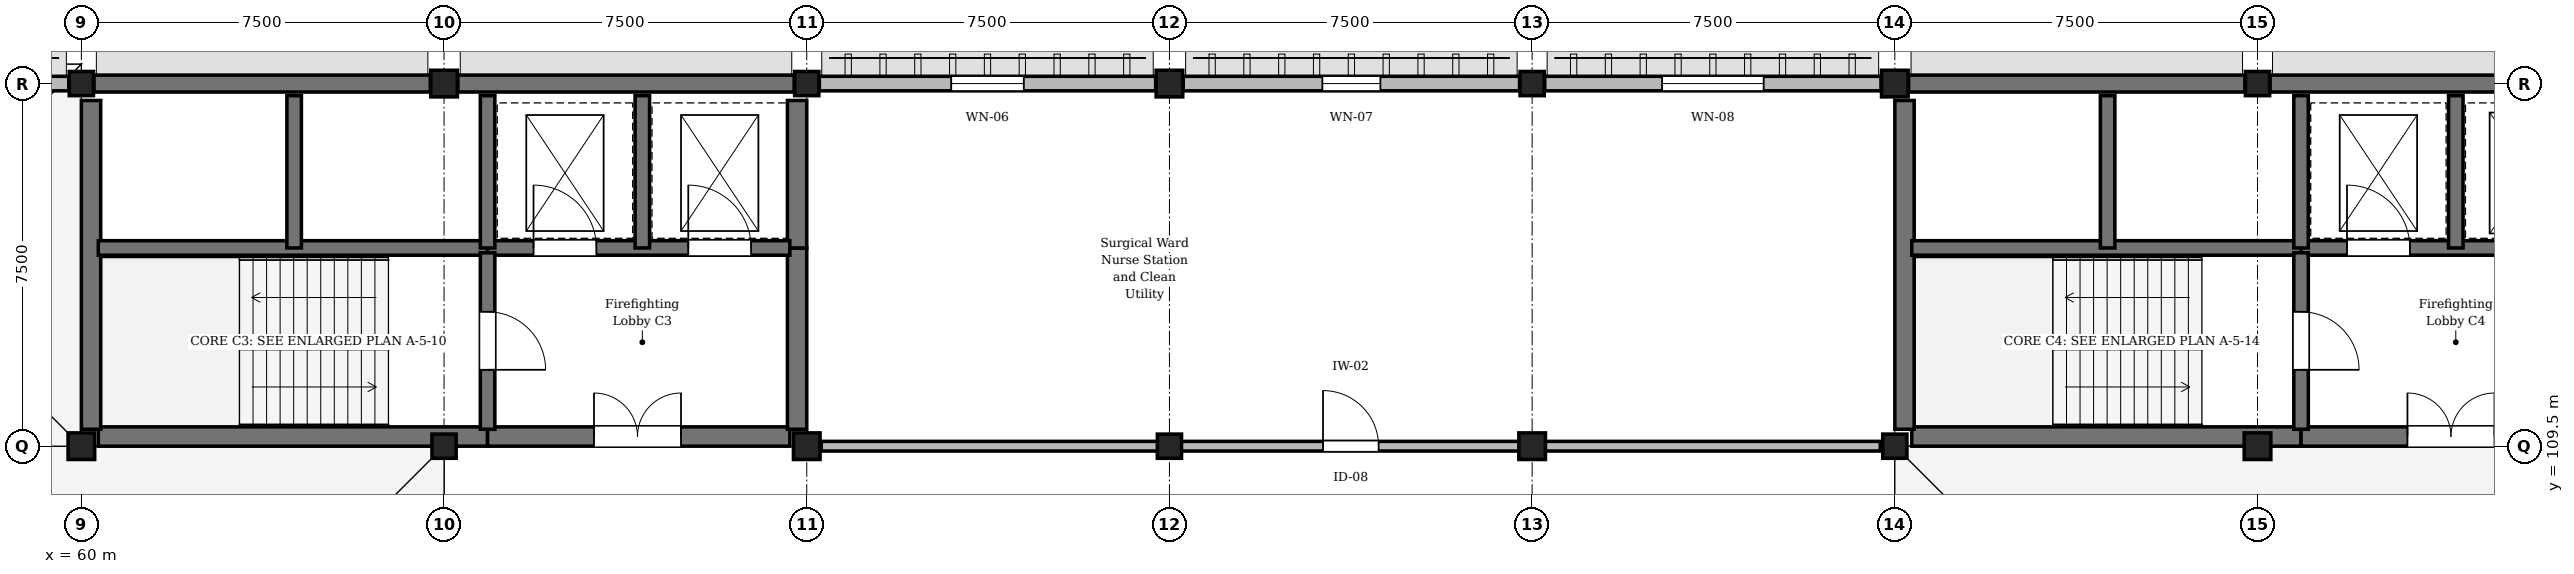
"""IFC4 building model, lengths in metres.
Left out: names, types, materials, properties, quantities, classifications, styles, units other than length and angle.
Written with IfcOpenShell. Run it as: python <this file> out.ifc"""

import sys

from ifc_helpers import new_model, si_unit, direction, frame, frame_2d, origin, origin_2d, place, context, subcontext, project, spatial, rectangle, extrude, element, fill, save


model = new_model("IFC4")
c1 = context("Model", 3, precision=1e-05, world=origin(), true_north=direction((0.0, 1.0)))
c2 = subcontext(c1, "Body", "Model", "MODEL_VIEW")
j1 = project(units=[si_unit("LENGTHUNIT", "METRE"), si_unit("PLANEANGLEUNIT", "RADIAN")], contexts=[c1])
p1 = place(None, origin())
s1 = spatial("IfcSite", under=j1, at=p1, CompositionType="ELEMENT")
p2 = place(p1, origin())
s2 = spatial("IfcBuilding", under=s1, at=p2, CompositionType="ELEMENT")
p3 = place(p2, frame((0.0, 0.0, 17.85)))
s3 = spatial("IfcBuildingStorey", under=s2, at=p3, CompositionType="ELEMENT", Elevation=17.85)
p4 = place(p3, frame((60.0, 109.5, 0.0), z_axis=(0.0, 0.0, 1.0), x_axis=(1.0, 0.0, 0.0)))
e1 = element("IfcColumn", 1, at=p4, inside=s3, PredefinedType="COLUMN", context=c2, shape_type="SweptSolid", body=[
    extrude(rectangle(XDim=0.55, YDim=0.55, at=origin_2d()), origin(), (0.0, 0.0, 1.0), 4.05),
])
for number, where, z_axis, x_axis in (
    (2, (60.0, 117.0, 0.0), (0.0, 0.0, 1.0), (1.0, 0.0, 0.0)),
    (3, (67.5, 109.5, 0.0), (0.0, 0.0, 1.0), (1.0, 0.0, 0.0)),
):
    element("IfcColumn", number, at=place(p3, frame(where, z_axis=z_axis, x_axis=x_axis)), inside=s3, PredefinedType="COLUMN", context=c2, shape_type="SweptSolid", body=[
        extrude(rectangle(XDim=0.5, YDim=0.5, at=origin_2d()), origin(), (0.0, 0.0, 1.0), 4.05),
    ])
for number, where, z_axis, x_axis in (
    (4, (67.5, 117.0, 0.0), (0.0, 0.0, 1.0), (1.0, 0.0, 0.0)),
    (5, (75.0, 109.5, 0.0), (0.0, 0.0, 1.0), (1.0, 0.0, 0.0)),
):
    element("IfcColumn", number, at=place(p3, frame(where, z_axis=z_axis, x_axis=x_axis)), inside=s3, PredefinedType="COLUMN", context=c2, shape_type="SweptSolid", body=[
        extrude(rectangle(XDim=0.55, YDim=0.55, at=origin_2d()), origin(), (0.0, 0.0, 1.0), 4.05),
    ])
for number, where, z_axis, x_axis in (
    (6, (75.0, 117.0, 0.0), (0.0, 0.0, 1.0), (1.0, 0.0, 0.0)),
    (7, (82.5, 109.5, 0.0), (0.0, 0.0, 1.0), (1.0, 0.0, 0.0)),
):
    element("IfcColumn", number, at=place(p3, frame(where, z_axis=z_axis, x_axis=x_axis)), inside=s3, PredefinedType="COLUMN", context=c2, shape_type="SweptSolid", body=[
        extrude(rectangle(XDim=0.5, YDim=0.5, at=origin_2d()), origin(), (0.0, 0.0, 1.0), 4.05),
    ])
for number, where, z_axis, x_axis in (
    (8, (82.5, 117.0, 0.0), (0.0, 0.0, 1.0), (1.0, 0.0, 0.0)),
    (9, (90.0, 109.5, 0.0), (0.0, 0.0, 1.0), (1.0, 0.0, 0.0)),
):
    element("IfcColumn", number, at=place(p3, frame(where, z_axis=z_axis, x_axis=x_axis)), inside=s3, PredefinedType="COLUMN", context=c2, shape_type="SweptSolid", body=[
        extrude(rectangle(XDim=0.55, YDim=0.55, at=origin_2d()), origin(), (0.0, 0.0, 1.0), 4.05),
    ])
for number, where, z_axis, x_axis in (
    (10, (90.0, 117.0, 0.0), (0.0, 0.0, 1.0), (1.0, 0.0, 0.0)),
    (11, (97.5, 109.5, 0.0), (0.0, 0.0, 1.0), (1.0, 0.0, 0.0)),
):
    element("IfcColumn", number, at=place(p3, frame(where, z_axis=z_axis, x_axis=x_axis)), inside=s3, PredefinedType="COLUMN", context=c2, shape_type="SweptSolid", body=[
        extrude(rectangle(XDim=0.5, YDim=0.5, at=origin_2d()), origin(), (0.0, 0.0, 1.0), 4.05),
    ])
for number, where, z_axis, x_axis in (
    (12, (97.5, 117.0, 0.0), (0.0, 0.0, 1.0), (1.0, 0.0, 0.0)),
    (13, (105.0, 109.5, 0.0), (0.0, 0.0, 1.0), (1.0, 0.0, 0.0)),
):
    element("IfcColumn", number, at=place(p3, frame(where, z_axis=z_axis, x_axis=x_axis)), inside=s3, PredefinedType="COLUMN", context=c2, shape_type="SweptSolid", body=[
        extrude(rectangle(XDim=0.55, YDim=0.55, at=origin_2d()), origin(), (0.0, 0.0, 1.0), 4.05),
    ])
p5 = place(p3, frame((105.0, 117.0, 0.0), z_axis=(0.0, 0.0, 1.0), x_axis=(1.0, 0.0, 0.0)))
e14 = element("IfcColumn", 14, at=p5, inside=s3, PredefinedType="COLUMN", context=c2, shape_type="SweptSolid", body=[
    extrude(rectangle(XDim=0.5, YDim=0.5, at=origin_2d()), origin(), (0.0, 0.0, 1.0), 4.05),
])
p6 = place(p3, frame((52.735, 117.0, 0.0), z_axis=(0.0, 0.0, 1.0), x_axis=(1.0, 0.0, 0.0)))
e15 = element("IfcWall", 15, at=p6, inside=s3, PredefinedType="STANDARD", context=c2, shape_type="SweptSolid", body=[
    extrude(rectangle(XDim=7.005, YDim=0.3, at=frame_2d((3.502, 0.0))), origin(), (0.0, 0.0, 1.0), 3.77),
])
p7 = place(p6, frame((2.452, 0.0, 0.9)))
e16 = element("IfcOpeningElement", 16, at=p7, cuts=e15, PredefinedType="OPENING", context=c2, shape_type="SweptSolid", body=[
    extrude(rectangle(XDim=2.1, YDim=2.4, at=frame_2d((1.05, 1.2))), frame((0.0, 0.16, 0.0), z_axis=(0.0, -1.0, 0.0), x_axis=(1.0, 0.0, 0.0)), (0.0, 0.0, 1.0), 0.32),
])
for number, where, z_axis, x_axis in (
    (17, (60.26, 117.0, 0.0), (0.0, 0.0, 1.0), (1.0, 0.0, 0.0)),
    (18, (67.785, 117.0, 0.0), (0.0, 0.0, 1.0), (1.0, 0.0, 0.0)),
):
    element("IfcWall", number, at=place(p3, frame(where, z_axis=z_axis, x_axis=x_axis)), inside=s3, PredefinedType="SHEAR", context=c2, shape_type="SweptSolid", body=[
        extrude(rectangle(XDim=6.955, YDim=0.35, at=frame_2d((3.478, 0.0))), origin(), (0.0, 0.0, 1.0), 3.77),
    ])
p8 = place(p3, frame((75.26, 117.0, 0.0), z_axis=(0.0, 0.0, 1.0), x_axis=(1.0, 0.0, 0.0)))
e19 = element("IfcWall", 19, at=p8, inside=s3, PredefinedType="STANDARD", context=c2, shape_type="SweptSolid", body=[
    extrude(rectangle(XDim=6.955, YDim=0.3, at=frame_2d((3.478, 0.0))), origin(), (0.0, 0.0, 1.0), 3.17),
])
p9 = place(p8, frame((2.728, 0.0, 0.9)))
e20 = element("IfcOpeningElement", 20, at=p9, cuts=e19, PredefinedType="OPENING", context=c2, shape_type="SweptSolid", body=[
    extrude(rectangle(XDim=1.5, YDim=1.99, at=frame_2d((0.75, 0.995))), frame((0.0, 0.16, 0.0), z_axis=(0.0, -1.0, 0.0), x_axis=(1.0, 0.0, 0.0)), (0.0, 0.0, 1.0), 0.32),
])
p10 = place(p3, frame((82.785, 117.0, 0.0), z_axis=(0.0, 0.0, 1.0), x_axis=(1.0, 0.0, 0.0)))
e21 = element("IfcWall", 21, at=p10, inside=s3, PredefinedType="STANDARD", context=c2, shape_type="SweptSolid", body=[
    extrude(rectangle(XDim=6.955, YDim=0.3, at=frame_2d((3.478, 0.0))), origin(), (0.0, 0.0, 1.0), 3.17),
])
p11 = place(p10, frame((2.877, 0.0, 0.9)))
e22 = element("IfcOpeningElement", 22, at=p11, cuts=e21, PredefinedType="OPENING", context=c2, shape_type="SweptSolid", body=[
    extrude(rectangle(XDim=1.2, YDim=1.99, at=frame_2d((0.6, 0.995))), frame((0.0, 0.16, 0.0), z_axis=(0.0, -1.0, 0.0), x_axis=(1.0, 0.0, 0.0)), (0.0, 0.0, 1.0), 0.32),
])
p12 = place(p3, frame((90.26, 117.0, 0.0), z_axis=(0.0, 0.0, 1.0), x_axis=(1.0, 0.0, 0.0)))
e23 = element("IfcWall", 23, at=p12, inside=s3, PredefinedType="STANDARD", context=c2, shape_type="SweptSolid", body=[
    extrude(rectangle(XDim=6.955, YDim=0.3, at=frame_2d((3.478, 0.0))), origin(), (0.0, 0.0, 1.0), 3.17),
])
p13 = place(p12, frame((2.427, 0.0, 0.9)))
e24 = element("IfcOpeningElement", 24, at=p13, cuts=e23, PredefinedType="OPENING", context=c2, shape_type="SweptSolid", body=[
    extrude(rectangle(XDim=2.1, YDim=1.99, at=frame_2d((1.05, 0.995))), frame((0.0, 0.16, 0.0), z_axis=(0.0, -1.0, 0.0), x_axis=(1.0, 0.0, 0.0)), (0.0, 0.0, 1.0), 0.32),
])
for number, where, z_axis, x_axis in (
    (25, (97.785, 117.0, 0.0), (0.0, 0.0, 1.0), (1.0, 0.0, 0.0)),
    (26, (105.26, 117.0, 0.0), (0.0, 0.0, 1.0), (1.0, 0.0, 0.0)),
):
    element("IfcWall", number, at=place(p3, frame(where, z_axis=z_axis, x_axis=x_axis)), inside=s3, PredefinedType="SHEAR", context=c2, shape_type="SweptSolid", body=[
        extrude(rectangle(XDim=6.955, YDim=0.35, at=frame_2d((3.478, 0.0))), origin(), (0.0, 0.0, 1.0), 3.77),
    ])
p14 = place(p3, frame((60.35, 109.7, 0.0), z_axis=(0.0, 0.0, 1.0), x_axis=(1.0, 0.0, 0.0)))
e27 = element("IfcWall", 27, at=p14, inside=s3, PredefinedType="SHEAR", context=c2, shape_type="SweptSolid", body=[
    extrude(rectangle(XDim=8.05, YDim=0.4, at=frame_2d((4.025, 0.0))), origin(), (0.0, 0.0, 1.0), 3.77),
])
p15 = place(p3, frame((68.4, 109.7, 0.0), z_axis=(0.0, 0.0, 1.0), x_axis=(1.0, 0.0, 0.0)))
e28 = element("IfcWall", 28, at=p15, inside=s3, PredefinedType="SHEAR", context=c2, shape_type="SweptSolid", body=[
    extrude(rectangle(XDim=6.25, YDim=0.4, at=frame_2d((3.125, 0.0))), origin(), (0.0, 0.0, 1.0), 3.77),
])
p16 = place(p15, frame((2.2, 0.0, 0.0)))
e29 = element("IfcOpeningElement", 29, at=p16, cuts=e28, PredefinedType="OPENING", context=c2, shape_type="SweptSolid", body=[
    extrude(rectangle(XDim=1.8, YDim=2.25, at=frame_2d((0.9, 1.125))), frame((0.0, 0.21, 0.0), z_axis=(0.0, -1.0, 0.0), x_axis=(1.0, 0.0, 0.0)), (0.0, 0.0, 1.0), 0.42),
])
p17 = place(p3, frame((60.2, 109.85, 0.0), z_axis=(0.0, 0.0, 1.0), x_axis=(0.0, 1.0, 0.0)))
e30 = element("IfcWall", 30, at=p17, inside=s3, PredefinedType="SHEAR", context=c2, shape_type="SweptSolid", body=[
    extrude(rectangle(XDim=6.8, YDim=0.4, at=frame_2d((3.4, 0.0))), origin(), (0.0, 0.0, 1.0), 3.77),
])
p18 = place(p3, frame((74.8, 109.85, 0.0), z_axis=(0.0, 0.0, 1.0), x_axis=(0.0, 1.0, 0.0)))
e31 = element("IfcWall", 31, at=p18, inside=s3, PredefinedType="SHEAR", context=c2, shape_type="SweptSolid", body=[
    extrude(rectangle(XDim=3.75, YDim=0.4, at=frame_2d((1.875, 0.0))), origin(), (0.0, 0.0, 1.0), 3.77),
])
p19 = place(p3, frame((74.8, 113.6, 0.0), z_axis=(0.0, 0.0, 1.0), x_axis=(0.0, 1.0, 0.0)))
e32 = element("IfcWall", 32, at=p19, inside=s3, PredefinedType="SHEAR", context=c2, shape_type="SweptSolid", body=[
    extrude(rectangle(XDim=3.05, YDim=0.4, at=frame_2d((1.525, 0.0))), origin(), (0.0, 0.0, 1.0), 3.77),
])
p20 = place(p3, frame((60.35, 113.6, 0.0), z_axis=(0.0, 0.0, 1.0), x_axis=(1.0, 0.0, 0.0)))
e33 = element("IfcWall", 33, at=p20, inside=s3, PredefinedType="SHEAR", context=c2, shape_type="SweptSolid", body=[
    extrude(rectangle(XDim=8.05, YDim=0.3, at=frame_2d((4.025, 0.0))), origin(), (0.0, 0.0, 1.0), 3.77),
])
p21 = place(p3, frame((68.4, 113.6, 0.0), z_axis=(0.0, 0.0, 1.0), x_axis=(1.0, 0.0, 0.0)))
e34 = element("IfcWall", 34, at=p21, inside=s3, PredefinedType="SHEAR", context=c2, shape_type="SweptSolid", body=[
    extrude(rectangle(XDim=6.25, YDim=0.3, at=frame_2d((3.125, 0.0))), origin(), (0.0, 0.0, 1.0), 3.77),
])
p22 = place(p21, frame((0.95, 0.0, 0.0)))
e35 = element("IfcOpeningElement", 35, at=p22, cuts=e34, PredefinedType="OPENING", context=c2, shape_type="SweptSolid", body=[
    extrude(rectangle(XDim=1.3, YDim=2.2, at=frame_2d((0.65, 1.1))), frame((0.0, 0.16, 0.0), z_axis=(0.0, -1.0, 0.0), x_axis=(1.0, 0.0, 0.0)), (0.0, 0.0, 1.0), 0.32),
])
p23 = place(p21, frame((4.15, 0.0, 0.0)))
e36 = element("IfcOpeningElement", 36, at=p23, cuts=e34, PredefinedType="OPENING", context=c2, shape_type="SweptSolid", body=[
    extrude(rectangle(XDim=1.3, YDim=2.2, at=frame_2d((0.65, 1.1))), frame((0.0, 0.16, 0.0), z_axis=(0.0, -1.0, 0.0), x_axis=(1.0, 0.0, 0.0)), (0.0, 0.0, 1.0), 0.32),
])
p24 = place(p3, frame((68.4, 113.5, 0.0), z_axis=(0.0, 0.0, 1.0), x_axis=(0.0, -1.0, 0.0)))
e37 = element("IfcWall", 37, at=p24, inside=s3, PredefinedType="SHEAR", context=c2, shape_type="SweptSolid", body=[
    extrude(rectangle(XDim=3.65, YDim=0.3, at=frame_2d((1.825, 0.0))), origin(), (0.0, 0.0, 1.0), 3.77),
])
p25 = place(p24, frame((1.22, 0.0, 0.0)))
e38 = element("IfcOpeningElement", 38, at=p25, cuts=e37, PredefinedType="OPENING", context=c2, shape_type="SweptSolid", body=[
    extrude(rectangle(XDim=1.2, YDim=2.25, at=frame_2d((0.6, 1.125))), frame((0.0, 0.16, 0.0), z_axis=(0.0, -1.0, 0.0), x_axis=(1.0, 0.0, 0.0)), (0.0, 0.0, 1.0), 0.32),
])
for number, where, z_axis, x_axis in (
    (39, (64.4, 113.6, 0.0), (0.0, 0.0, 1.0), (0.0, 1.0, 0.0)),
    (40, (68.4, 113.6, 0.0), (0.0, 0.0, 1.0), (0.0, 1.0, 0.0)),
    (41, (71.6, 113.6, 0.0), (0.0, 0.0, 1.0), (0.0, 1.0, 0.0)),
):
    element("IfcWall", number, at=place(p3, frame(where, z_axis=z_axis, x_axis=x_axis)), inside=s3, PredefinedType="SHEAR", context=c2, shape_type="SweptSolid", body=[
        extrude(rectangle(XDim=3.15, YDim=0.3, at=frame_2d((1.575, 0.0))), origin(), (0.0, 0.0, 1.0), 3.77),
    ])
p26 = place(p3, frame((97.85, 109.7, 0.0), z_axis=(0.0, 0.0, 1.0), x_axis=(1.0, 0.0, 0.0)))
e42 = element("IfcWall", 42, at=p26, inside=s3, PredefinedType="SHEAR", context=c2, shape_type="SweptSolid", body=[
    extrude(rectangle(XDim=8.05, YDim=0.4, at=frame_2d((4.025, 0.0))), origin(), (0.0, 0.0, 1.0), 3.77),
])
p27 = place(p3, frame((105.9, 109.7, 0.0), z_axis=(0.0, 0.0, 1.0), x_axis=(1.0, 0.0, 0.0)))
e43 = element("IfcWall", 43, at=p27, inside=s3, PredefinedType="SHEAR", context=c2, shape_type="SweptSolid", body=[
    extrude(rectangle(XDim=6.25, YDim=0.4, at=frame_2d((3.125, 0.0))), origin(), (0.0, 0.0, 1.0), 3.77),
])
p28 = place(p27, frame((2.2, 0.0, 0.0)))
e44 = element("IfcOpeningElement", 44, at=p28, cuts=e43, PredefinedType="OPENING", context=c2, shape_type="SweptSolid", body=[
    extrude(rectangle(XDim=1.8, YDim=2.25, at=frame_2d((0.9, 1.125))), frame((0.0, 0.21, 0.0), z_axis=(0.0, -1.0, 0.0), x_axis=(1.0, 0.0, 0.0)), (0.0, 0.0, 1.0), 0.42),
])
p29 = place(p3, frame((97.7, 109.85, 0.0), z_axis=(0.0, 0.0, 1.0), x_axis=(0.0, 1.0, 0.0)))
e45 = element("IfcWall", 45, at=p29, inside=s3, PredefinedType="SHEAR", context=c2, shape_type="SweptSolid", body=[
    extrude(rectangle(XDim=6.8, YDim=0.4, at=frame_2d((3.4, 0.0))), origin(), (0.0, 0.0, 1.0), 3.77),
])
p30 = place(p3, frame((97.85, 113.6, 0.0), z_axis=(0.0, 0.0, 1.0), x_axis=(1.0, 0.0, 0.0)))
e46 = element("IfcWall", 46, at=p30, inside=s3, PredefinedType="SHEAR", context=c2, shape_type="SweptSolid", body=[
    extrude(rectangle(XDim=8.05, YDim=0.3, at=frame_2d((4.025, 0.0))), origin(), (0.0, 0.0, 1.0), 3.77),
])
p31 = place(p3, frame((105.9, 113.6, 0.0), z_axis=(0.0, 0.0, 1.0), x_axis=(1.0, 0.0, 0.0)))
e47 = element("IfcWall", 47, at=p31, inside=s3, PredefinedType="SHEAR", context=c2, shape_type="SweptSolid", body=[
    extrude(rectangle(XDim=6.25, YDim=0.3, at=frame_2d((3.125, 0.0))), origin(), (0.0, 0.0, 1.0), 3.77),
])
p32 = place(p31, frame((0.95, 0.0, 0.0)))
e48 = element("IfcOpeningElement", 48, at=p32, cuts=e47, PredefinedType="OPENING", context=c2, shape_type="SweptSolid", body=[
    extrude(rectangle(XDim=1.3, YDim=2.2, at=frame_2d((0.65, 1.1))), frame((0.0, 0.16, 0.0), z_axis=(0.0, -1.0, 0.0), x_axis=(1.0, 0.0, 0.0)), (0.0, 0.0, 1.0), 0.32),
])
p33 = place(p31, frame((4.1, 0.0, 0.0)))
e49 = element("IfcOpeningElement", 49, at=p33, cuts=e47, PredefinedType="OPENING", context=c2, shape_type="SweptSolid", body=[
    extrude(rectangle(XDim=1.4, YDim=2.25, at=frame_2d((0.7, 1.125))), frame((0.0, 0.16, 0.0), z_axis=(0.0, -1.0, 0.0), x_axis=(1.0, 0.0, 0.0)), (0.0, 0.0, 1.0), 0.32),
])
p34 = place(p3, frame((105.9, 113.5, 0.0), z_axis=(0.0, 0.0, 1.0), x_axis=(0.0, -1.0, 0.0)))
e50 = element("IfcWall", 50, at=p34, inside=s3, PredefinedType="SHEAR", context=c2, shape_type="SweptSolid", body=[
    extrude(rectangle(XDim=3.65, YDim=0.3, at=frame_2d((1.825, 0.0))), origin(), (0.0, 0.0, 1.0), 3.77),
])
p35 = place(p34, frame((1.22, 0.0, 0.0)))
e51 = element("IfcOpeningElement", 51, at=p35, cuts=e50, PredefinedType="OPENING", context=c2, shape_type="SweptSolid", body=[
    extrude(rectangle(XDim=1.2, YDim=2.25, at=frame_2d((0.6, 1.125))), frame((0.0, 0.16, 0.0), z_axis=(0.0, -1.0, 0.0), x_axis=(1.0, 0.0, 0.0)), (0.0, 0.0, 1.0), 0.32),
])
for number, where, z_axis, x_axis in (
    (52, (101.9, 113.6, 0.0), (0.0, 0.0, 1.0), (0.0, 1.0, 0.0)),
    (53, (105.9, 113.6, 0.0), (0.0, 0.0, 1.0), (0.0, 1.0, 0.0)),
    (54, (109.1, 113.6, 0.0), (0.0, 0.0, 1.0), (0.0, 1.0, 0.0)),
):
    element("IfcWall", number, at=place(p3, frame(where, z_axis=z_axis, x_axis=x_axis)), inside=s3, PredefinedType="SHEAR", context=c2, shape_type="SweptSolid", body=[
        extrude(rectangle(XDim=3.15, YDim=0.3, at=frame_2d((1.575, 0.0))), origin(), (0.0, 0.0, 1.0), 3.77),
    ])
p36 = place(p3, frame((75.3, 109.5, 0.0), z_axis=(0.0, 0.0, 1.0), x_axis=(1.0, 0.0, 0.0)))
e55 = element("IfcWall", 55, at=p36, inside=s3, PredefinedType="STANDARD", context=c2, shape_type="SweptSolid", body=[
    extrude(rectangle(XDim=21.9, YDim=0.2, at=frame_2d((10.95, 0.0))), origin(), (0.0, 0.0, 1.0), 3.015),
])
p37 = place(p36, frame((10.375, 0.0, 0.0)))
e56 = element("IfcOpeningElement", 56, at=p37, cuts=e55, PredefinedType="OPENING", context=c2, shape_type="SweptSolid", body=[
    extrude(rectangle(XDim=1.15, YDim=2.2, at=frame_2d((0.575, 1.1))), frame((0.0, 0.11, 0.0), z_axis=(0.0, -1.0, 0.0), x_axis=(1.0, 0.0, 0.0)), (0.0, 0.0, 1.0), 0.22),
])
p38 = place(p9, origin())
e57 = element("IfcWindow", 57, at=p38, inside=s3, PartitioningType="SINGLE_PANEL", PredefinedType="WINDOW", context=c2, shape_type="SweptSolid", body=[
    extrude(rectangle(XDim=1.5, YDim=1.99, at=frame_2d((0.75, 0.995))), frame((0.0, 0.03, 0.0), z_axis=(0.0, -1.0, 0.0), x_axis=(1.0, 0.0, 0.0)), (0.0, 0.0, 1.0), 0.06),
])
fill(e20, e57)
p39 = place(p11, origin())
e58 = element("IfcWindow", 58, at=p39, inside=s3, PartitioningType="SINGLE_PANEL", PredefinedType="WINDOW", context=c2, shape_type="SweptSolid", body=[
    extrude(rectangle(XDim=1.2, YDim=1.99, at=frame_2d((0.6, 0.995))), frame((0.0, 0.03, 0.0), z_axis=(0.0, -1.0, 0.0), x_axis=(1.0, 0.0, 0.0)), (0.0, 0.0, 1.0), 0.06),
])
fill(e22, e58)
p40 = place(p13, origin())
e59 = element("IfcWindow", 59, at=p40, inside=s3, PartitioningType="SINGLE_PANEL", PredefinedType="WINDOW", context=c2, shape_type="SweptSolid", body=[
    extrude(rectangle(XDim=2.1, YDim=1.99, at=frame_2d((1.05, 0.995))), frame((0.0, 0.03, 0.0), z_axis=(0.0, -1.0, 0.0), x_axis=(1.0, 0.0, 0.0)), (0.0, 0.0, 1.0), 0.06),
])
fill(e24, e59)
p41 = place(p16, origin())
e60 = element("IfcDoor", 60, at=p41, inside=s3, OperationType="DOUBLE_DOOR_SINGLE_SWING", PredefinedType="DOOR", context=c2, shape_type="SweptSolid", body=[
    extrude(rectangle(XDim=1.8, YDim=2.25, at=frame_2d((0.9, 1.125))), frame((0.0, 0.025, 0.0), z_axis=(0.0, -1.0, 0.0), x_axis=(1.0, 0.0, 0.0)), (0.0, 0.0, 1.0), 0.05),
])
fill(e29, e60)
p42 = place(p22, origin())
e61 = element("IfcDoor", 61, at=p42, inside=s3, OperationType="DOUBLE_DOOR_SLIDING", PredefinedType="DOOR", context=c2, shape_type="SweptSolid", body=[
    extrude(rectangle(XDim=1.3, YDim=2.2, at=frame_2d((0.65, 1.1))), frame((0.0, 0.025, 0.0), z_axis=(0.0, -1.0, 0.0), x_axis=(1.0, 0.0, 0.0)), (0.0, 0.0, 1.0), 0.05),
])
fill(e35, e61)
p43 = place(p23, origin())
e62 = element("IfcDoor", 62, at=p43, inside=s3, OperationType="DOUBLE_DOOR_SLIDING", PredefinedType="DOOR", context=c2, shape_type="SweptSolid", body=[
    extrude(rectangle(XDim=1.3, YDim=2.2, at=frame_2d((0.65, 1.1))), frame((0.0, 0.025, 0.0), z_axis=(0.0, -1.0, 0.0), x_axis=(1.0, 0.0, 0.0)), (0.0, 0.0, 1.0), 0.05),
])
fill(e36, e62)
p44 = place(p25, origin())
e63 = element("IfcDoor", 63, at=p44, inside=s3, OperationType="SINGLE_SWING_RIGHT", PredefinedType="DOOR", context=c2, shape_type="SweptSolid", body=[
    extrude(rectangle(XDim=1.2, YDim=2.25, at=frame_2d((0.6, 1.125))), frame((0.0, 0.025, 0.0), z_axis=(0.0, -1.0, 0.0), x_axis=(1.0, 0.0, 0.0)), (0.0, 0.0, 1.0), 0.05),
])
fill(e38, e63)
p45 = place(p28, origin())
e64 = element("IfcDoor", 64, at=p45, inside=s3, OperationType="DOUBLE_DOOR_SINGLE_SWING", PredefinedType="DOOR", context=c2, shape_type="SweptSolid", body=[
    extrude(rectangle(XDim=1.8, YDim=2.25, at=frame_2d((0.9, 1.125))), frame((0.0, 0.025, 0.0), z_axis=(0.0, -1.0, 0.0), x_axis=(1.0, 0.0, 0.0)), (0.0, 0.0, 1.0), 0.05),
])
fill(e44, e64)
p46 = place(p32, origin())
e65 = element("IfcDoor", 65, at=p46, inside=s3, OperationType="DOUBLE_DOOR_SLIDING", PredefinedType="DOOR", context=c2, shape_type="SweptSolid", body=[
    extrude(rectangle(XDim=1.3, YDim=2.2, at=frame_2d((0.65, 1.1))), frame((0.0, 0.025, 0.0), z_axis=(0.0, -1.0, 0.0), x_axis=(1.0, 0.0, 0.0)), (0.0, 0.0, 1.0), 0.05),
])
fill(e48, e65)
p47 = place(p35, origin())
e66 = element("IfcDoor", 66, at=p47, inside=s3, OperationType="SINGLE_SWING_RIGHT", PredefinedType="DOOR", context=c2, shape_type="SweptSolid", body=[
    extrude(rectangle(XDim=1.2, YDim=2.25, at=frame_2d((0.6, 1.125))), frame((0.0, 0.025, 0.0), z_axis=(0.0, -1.0, 0.0), x_axis=(1.0, 0.0, 0.0)), (0.0, 0.0, 1.0), 0.05),
])
fill(e51, e66)
p48 = place(p37, origin())
e67 = element("IfcDoor", 67, at=p48, inside=s3, OperationType="SINGLE_SWING_LEFT", PredefinedType="DOOR", context=c2, shape_type="SweptSolid", body=[
    extrude(rectangle(XDim=1.15, YDim=2.2, at=frame_2d((0.575, 1.1))), frame((0.0, 0.025, 0.0), z_axis=(0.0, -1.0, 0.0), x_axis=(1.0, 0.0, 0.0)), (0.0, 0.0, 1.0), 0.05),
])
fill(e56, e67)
save(model, sys.argv[1])
